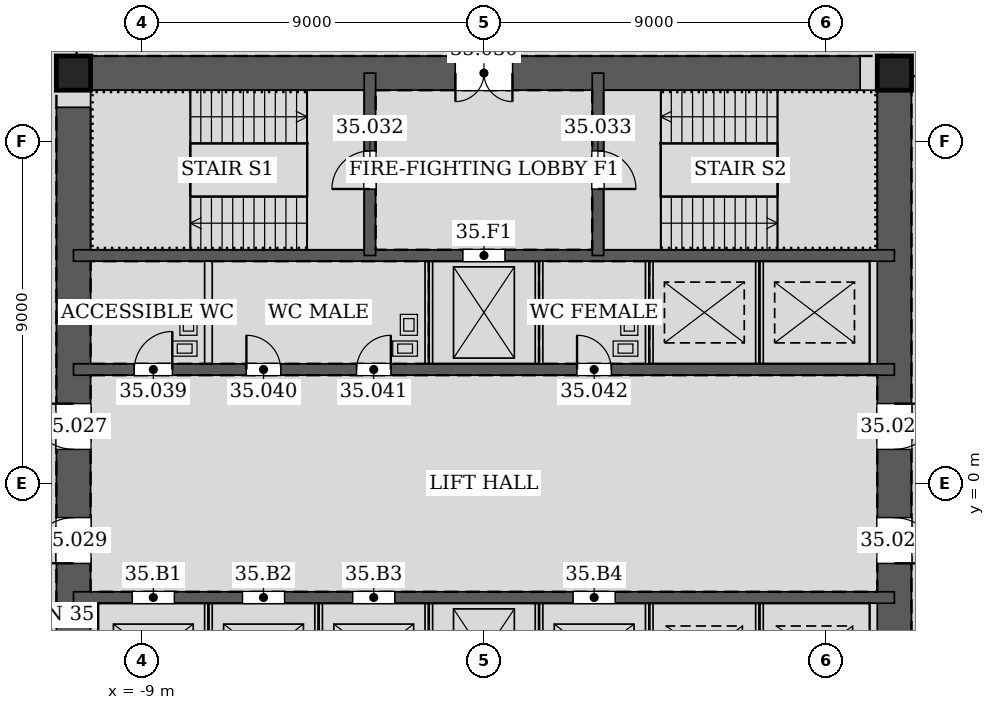
"""IFC4 building model, lengths in metres.
Left out: names, types, materials, properties, quantities, classifications, styles, units other than length and angle.
Written with IfcOpenShell. Run it as: python <this file> out.ifc"""

import sys

from ifc_helpers import new_model, si_unit, direction, frame, frame_2d, origin, origin_2d, place, context, subcontext, project, spatial, rectangle, hollow_rectangle, extrude, element, fill, save


model = new_model("IFC4")
c1 = context("Model", 3, precision=1e-05, world=origin(), true_north=direction((0.0, 1.0)))
c2 = subcontext(c1, "Body", "Model", "MODEL_VIEW")
j1 = project(units=[si_unit("LENGTHUNIT", "METRE"), si_unit("PLANEANGLEUNIT", "RADIAN")], contexts=[c1])
p1 = place(None, origin())
s1 = spatial("IfcSite", under=j1, at=p1, CompositionType="ELEMENT")
p2 = place(p1, origin())
s2 = spatial("IfcBuilding", under=s1, at=p2, CompositionType="ELEMENT")
p3 = place(p2, frame((0.0, 0.0, 155.4)))
s3 = spatial("IfcBuildingStorey", under=s2, at=p3, CompositionType="ELEMENT", Elevation=155.4)
for number, where, z_axis, x_axis in (
    (1, (10.8, 10.8, 0.0), (0.0, 0.0, 1.0), (1.0, 0.0, 0.0)),
    (2, (-10.8, 10.8, 0.0), (0.0, 0.0, 1.0), (1.0, 0.0, 0.0)),
):
    element("IfcColumn", number, at=place(p3, frame(where, z_axis=z_axis, x_axis=x_axis)), inside=s3, PredefinedType="COLUMN", context=c2, shape_type="SweptSolid", body=[
        extrude(hollow_rectangle(XDim=0.9, YDim=0.9, WallThickness=0.06, at=origin_2d()), origin(), (0.0, 0.0, 1.0), 4.2),
    ])
p4 = place(p3, frame((10.8, -10.8, 0.0), z_axis=(0.0, 0.0, 1.0), x_axis=(0.0, 1.0, 0.0)))
e3 = element("IfcWall", 3, at=p4, inside=s3, PredefinedType="SOLIDWALL", context=c2, shape_type="SweptSolid", body=[
    extrude(rectangle(XDim=21.6, YDim=0.9, at=frame_2d((10.8, 0.0))), origin(), (0.0, 0.0, 1.0), 4.2),
])
p5 = place(p4, frame((11.7, 0.0, 0.0)))
e4 = element("IfcOpeningElement", 4, at=p5, cuts=e3, PredefinedType="OPENING", context=c2, shape_type="SweptSolid", body=[
    extrude(rectangle(XDim=1.2, YDim=2.1, at=frame_2d((0.6, 1.05))), frame((0.0, 0.46, 0.0), z_axis=(0.0, -1.0, 0.0), x_axis=(1.0, 0.0, 0.0)), (0.0, 0.0, 1.0), 0.92),
])
p6 = place(p4, frame((8.7, 0.0, 0.0)))
e5 = element("IfcOpeningElement", 5, at=p6, cuts=e3, PredefinedType="OPENING", context=c2, shape_type="SweptSolid", body=[
    extrude(rectangle(XDim=1.2, YDim=2.1, at=frame_2d((0.6, 1.05))), frame((0.0, 0.46, 0.0), z_axis=(0.0, -1.0, 0.0), x_axis=(1.0, 0.0, 0.0)), (0.0, 0.0, 1.0), 0.92),
])
p7 = place(p3, frame((10.8, 10.8, 0.0), z_axis=(0.0, 0.0, 1.0), x_axis=(-1.0, 0.0, 0.0)))
e6 = element("IfcWall", 6, at=p7, inside=s3, PredefinedType="SOLIDWALL", context=c2, shape_type="SweptSolid", body=[
    extrude(rectangle(XDim=21.6, YDim=0.9, at=frame_2d((10.8, 0.0))), origin(), (0.0, 0.0, 1.0), 4.2),
])
p8 = place(p7, frame((10.05, 0.0, 0.0)))
e7 = element("IfcOpeningElement", 7, at=p8, cuts=e6, PredefinedType="OPENING", context=c2, shape_type="SweptSolid", body=[
    extrude(rectangle(XDim=1.5, YDim=2.1, at=frame_2d((0.75, 1.05))), frame((0.0, 0.46, 0.0), z_axis=(0.0, -1.0, 0.0), x_axis=(1.0, 0.0, 0.0)), (0.0, 0.0, 1.0), 0.92),
])
p9 = place(p3, frame((-10.8, 10.8, 0.0), z_axis=(0.0, 0.0, 1.0), x_axis=(0.0, -1.0, 0.0)))
e8 = element("IfcWall", 8, at=p9, inside=s3, PredefinedType="SOLIDWALL", context=c2, shape_type="SweptSolid", body=[
    extrude(rectangle(XDim=21.6, YDim=0.9, at=frame_2d((10.8, 0.0))), origin(), (0.0, 0.0, 1.0), 4.2),
])
p10 = place(p9, frame((8.7, 0.0, 0.0)))
e9 = element("IfcOpeningElement", 9, at=p10, cuts=e8, PredefinedType="OPENING", context=c2, shape_type="SweptSolid", body=[
    extrude(rectangle(XDim=1.2, YDim=2.1, at=frame_2d((0.6, 1.05))), frame((0.0, 0.46, 0.0), z_axis=(0.0, -1.0, 0.0), x_axis=(1.0, 0.0, 0.0)), (0.0, 0.0, 1.0), 0.92),
])
p11 = place(p9, frame((11.7, 0.0, 0.0)))
e10 = element("IfcOpeningElement", 10, at=p11, cuts=e8, PredefinedType="OPENING", context=c2, shape_type="SweptSolid", body=[
    extrude(rectangle(XDim=1.2, YDim=2.1, at=frame_2d((0.6, 1.05))), frame((0.0, 0.46, 0.0), z_axis=(0.0, -1.0, 0.0), x_axis=(1.0, 0.0, 0.0)), (0.0, 0.0, 1.0), 0.92),
])
p12 = place(p3, frame((-10.8, 3.0, 0.0), z_axis=(0.0, 0.0, 1.0), x_axis=(1.0, 0.0, 0.0)))
e11 = element("IfcWall", 11, at=p12, inside=s3, PredefinedType="SOLIDWALL", context=c2, shape_type="SweptSolid", body=[
    extrude(rectangle(XDim=21.6, YDim=0.3, at=frame_2d((10.8, 0.0))), origin(), (0.0, 0.0, 1.0), 4.2),
])
p13 = place(p12, frame((1.6, 0.0, 0.0)))
e12 = element("IfcOpeningElement", 12, at=p13, cuts=e11, PredefinedType="OPENING", context=c2, shape_type="SweptSolid", body=[
    extrude(rectangle(XDim=1.0, YDim=2.1, at=frame_2d((0.5, 1.05))), frame((0.0, 0.16, 0.0), z_axis=(0.0, -1.0, 0.0), x_axis=(1.0, 0.0, 0.0)), (0.0, 0.0, 1.0), 0.32),
])
p14 = place(p12, frame((4.55, 0.0, 0.0)))
e13 = element("IfcOpeningElement", 13, at=p14, cuts=e11, PredefinedType="OPENING", context=c2, shape_type="SweptSolid", body=[
    extrude(rectangle(XDim=0.9, YDim=2.1, at=frame_2d((0.45, 1.05))), frame((0.0, 0.16, 0.0), z_axis=(0.0, -1.0, 0.0), x_axis=(1.0, 0.0, 0.0)), (0.0, 0.0, 1.0), 0.32),
])
p15 = place(p12, frame((7.45, 0.0, 0.0)))
e14 = element("IfcOpeningElement", 14, at=p15, cuts=e11, PredefinedType="OPENING", context=c2, shape_type="SweptSolid", body=[
    extrude(rectangle(XDim=0.9, YDim=2.1, at=frame_2d((0.45, 1.05))), frame((0.0, 0.16, 0.0), z_axis=(0.0, -1.0, 0.0), x_axis=(1.0, 0.0, 0.0)), (0.0, 0.0, 1.0), 0.32),
])
p16 = place(p12, frame((13.25, 0.0, 0.0)))
e15 = element("IfcOpeningElement", 15, at=p16, cuts=e11, PredefinedType="OPENING", context=c2, shape_type="SweptSolid", body=[
    extrude(rectangle(XDim=0.9, YDim=2.1, at=frame_2d((0.45, 1.05))), frame((0.0, 0.16, 0.0), z_axis=(0.0, -1.0, 0.0), x_axis=(1.0, 0.0, 0.0)), (0.0, 0.0, 1.0), 0.32),
])
p17 = place(p3, frame((-10.8, 6.0, 0.0), z_axis=(0.0, 0.0, 1.0), x_axis=(1.0, 0.0, 0.0)))
e16 = element("IfcWall", 16, at=p17, inside=s3, PredefinedType="SOLIDWALL", context=c2, shape_type="SweptSolid", body=[
    extrude(rectangle(XDim=21.6, YDim=0.3, at=frame_2d((10.8, 0.0))), origin(), (0.0, 0.0, 1.0), 4.2),
])
p18 = place(p17, frame((10.25, 0.0, 0.0)))
e17 = element("IfcOpeningElement", 17, at=p18, cuts=e16, PredefinedType="OPENING", context=c2, shape_type="SweptSolid", body=[
    extrude(rectangle(XDim=1.1, YDim=2.1, at=frame_2d((0.55, 1.05))), frame((0.0, 0.16, 0.0), z_axis=(0.0, -1.0, 0.0), x_axis=(1.0, 0.0, 0.0)), (0.0, 0.0, 1.0), 0.32),
])
p19 = place(p3, frame((-3.0, 6.0, 0.0), z_axis=(0.0, 0.0, 1.0), x_axis=(0.0, 1.0, 0.0)))
e18 = element("IfcWall", 18, at=p19, inside=s3, PredefinedType="SOLIDWALL", context=c2, shape_type="SweptSolid", body=[
    extrude(rectangle(XDim=4.8, YDim=0.3, at=frame_2d((2.4, 0.0))), origin(), (0.0, 0.0, 1.0), 4.2),
])
p20 = place(p19, frame((1.75, 0.0, 0.0)))
e19 = element("IfcOpeningElement", 19, at=p20, cuts=e18, PredefinedType="OPENING", context=c2, shape_type="SweptSolid", body=[
    extrude(rectangle(XDim=1.0, YDim=2.1, at=frame_2d((0.5, 1.05))), frame((0.0, 0.16, 0.0), z_axis=(0.0, -1.0, 0.0), x_axis=(1.0, 0.0, 0.0)), (0.0, 0.0, 1.0), 0.32),
])
p21 = place(p3, frame((3.0, 6.0, 0.0), z_axis=(0.0, 0.0, 1.0), x_axis=(0.0, 1.0, 0.0)))
e20 = element("IfcWall", 20, at=p21, inside=s3, PredefinedType="SOLIDWALL", context=c2, shape_type="SweptSolid", body=[
    extrude(rectangle(XDim=4.8, YDim=0.3, at=frame_2d((2.4, 0.0))), origin(), (0.0, 0.0, 1.0), 4.2),
])
p22 = place(p21, frame((1.75, 0.0, 0.0)))
e21 = element("IfcOpeningElement", 21, at=p22, cuts=e20, PredefinedType="OPENING", context=c2, shape_type="SweptSolid", body=[
    extrude(rectangle(XDim=1.0, YDim=2.1, at=frame_2d((0.5, 1.05))), frame((0.0, 0.16, 0.0), z_axis=(0.0, -1.0, 0.0), x_axis=(1.0, 0.0, 0.0)), (0.0, 0.0, 1.0), 0.32),
])
p23 = place(p3, frame((-10.8, -3.0, 0.0), z_axis=(0.0, 0.0, 1.0), x_axis=(1.0, 0.0, 0.0)))
e22 = element("IfcWall", 22, at=p23, inside=s3, PredefinedType="SOLIDWALL", context=c2, shape_type="SweptSolid", body=[
    extrude(rectangle(XDim=21.6, YDim=0.3, at=frame_2d((10.8, 0.0))), origin(), (0.0, 0.0, 1.0), 4.2),
])
p24 = place(p23, frame((1.55, 0.0, 0.0)))
e23 = element("IfcOpeningElement", 23, at=p24, cuts=e22, PredefinedType="OPENING", context=c2, shape_type="SweptSolid", body=[
    extrude(rectangle(XDim=1.1, YDim=2.1, at=frame_2d((0.55, 1.05))), frame((0.0, 0.16, 0.0), z_axis=(0.0, -1.0, 0.0), x_axis=(1.0, 0.0, 0.0)), (0.0, 0.0, 1.0), 0.32),
])
p25 = place(p23, frame((4.45, 0.0, 0.0)))
e24 = element("IfcOpeningElement", 24, at=p25, cuts=e22, PredefinedType="OPENING", context=c2, shape_type="SweptSolid", body=[
    extrude(rectangle(XDim=1.1, YDim=2.1, at=frame_2d((0.55, 1.05))), frame((0.0, 0.16, 0.0), z_axis=(0.0, -1.0, 0.0), x_axis=(1.0, 0.0, 0.0)), (0.0, 0.0, 1.0), 0.32),
])
p26 = place(p23, frame((7.35, 0.0, 0.0)))
e25 = element("IfcOpeningElement", 25, at=p26, cuts=e22, PredefinedType="OPENING", context=c2, shape_type="SweptSolid", body=[
    extrude(rectangle(XDim=1.1, YDim=2.1, at=frame_2d((0.55, 1.05))), frame((0.0, 0.16, 0.0), z_axis=(0.0, -1.0, 0.0), x_axis=(1.0, 0.0, 0.0)), (0.0, 0.0, 1.0), 0.32),
])
p27 = place(p23, frame((13.15, 0.0, 0.0)))
e26 = element("IfcOpeningElement", 26, at=p27, cuts=e22, PredefinedType="OPENING", context=c2, shape_type="SweptSolid", body=[
    extrude(rectangle(XDim=1.1, YDim=2.1, at=frame_2d((0.55, 1.05))), frame((0.0, 0.16, 0.0), z_axis=(0.0, -1.0, 0.0), x_axis=(1.0, 0.0, 0.0)), (0.0, 0.0, 1.0), 0.32),
])
for number, where, z_axis, x_axis in (
    (27, (-7.25, 3.15, 0.0), (0.0, 0.0, 1.0), (0.0, 1.0, 0.0)),
    (28, (-1.45, 3.15, 0.0), (0.0, 0.0, 1.0), (0.0, 1.0, 0.0)),
    (29, (1.45, 3.15, 0.0), (0.0, 0.0, 1.0), (0.0, 1.0, 0.0)),
    (30, (4.35, 3.15, 0.0), (0.0, 0.0, 1.0), (0.0, 1.0, 0.0)),
):
    element("IfcWall", number, at=place(p3, frame(where, z_axis=z_axis, x_axis=x_axis)), inside=s3, PredefinedType="PARTITIONING", context=c2, shape_type="SweptSolid", body=[
        extrude(rectangle(XDim=2.7, YDim=0.2, at=frame_2d((1.35, 0.0))), origin(), (0.0, 0.0, 1.0), 4.035),
    ])
for number, where, z_axis, x_axis in (
    (31, (7.25, 3.15, 0.0), (0.0, 0.0, 1.0), (0.0, 1.0, 0.0)),
    (32, (-7.25, -5.85, 0.0), (0.0, 0.0, 1.0), (0.0, 1.0, 0.0)),
    (33, (-4.35, -5.85, 0.0), (0.0, 0.0, 1.0), (0.0, 1.0, 0.0)),
    (34, (-1.45, -5.85, 0.0), (0.0, 0.0, 1.0), (0.0, 1.0, 0.0)),
    (35, (1.45, -5.85, 0.0), (0.0, 0.0, 1.0), (0.0, 1.0, 0.0)),
    (36, (4.35, -5.85, 0.0), (0.0, 0.0, 1.0), (0.0, 1.0, 0.0)),
    (37, (7.25, -5.85, 0.0), (0.0, 0.0, 1.0), (0.0, 1.0, 0.0)),
):
    element("IfcWall", number, at=place(p3, frame(where, z_axis=z_axis, x_axis=x_axis)), inside=s3, PredefinedType="PARTITIONING", context=c2, shape_type="SweptSolid", body=[
        extrude(rectangle(XDim=2.7, YDim=0.2, at=frame_2d((1.35, 0.0))), origin(), (0.0, 0.0, 1.0), 4.2),
    ])
p28 = place(p5, frame((1.2, 0.0, 0.0), z_axis=(0.0, 0.0, 1.0), x_axis=(-1.0, 0.0, 0.0)))
e38 = element("IfcDoor", 38, at=p28, inside=s3, OperationType="SINGLE_SWING_LEFT", PredefinedType="DOOR", context=c2, shape_type="SweptSolid", body=[
    extrude(rectangle(XDim=1.2, YDim=2.1, at=frame_2d((0.6, 1.05))), frame((0.0, 0.025, 0.0), z_axis=(0.0, -1.0, 0.0), x_axis=(1.0, 0.0, 0.0)), (0.0, 0.0, 1.0), 0.05),
])
fill(e4, e38)
p29 = place(p10, frame((1.2, 0.0, 0.0), z_axis=(0.0, 0.0, 1.0), x_axis=(-1.0, 0.0, 0.0)))
e39 = element("IfcDoor", 39, at=p29, inside=s3, OperationType="SINGLE_SWING_RIGHT", PredefinedType="DOOR", context=c2, shape_type="SweptSolid", body=[
    extrude(rectangle(XDim=1.2, YDim=2.1, at=frame_2d((0.6, 1.05))), frame((0.0, 0.025, 0.0), z_axis=(0.0, -1.0, 0.0), x_axis=(1.0, 0.0, 0.0)), (0.0, 0.0, 1.0), 0.05),
])
fill(e9, e39)
p30 = place(p6, frame((1.2, 0.0, 0.0), z_axis=(0.0, 0.0, 1.0), x_axis=(-1.0, 0.0, 0.0)))
e40 = element("IfcDoor", 40, at=p30, inside=s3, OperationType="SINGLE_SWING_RIGHT", PredefinedType="DOOR", context=c2, shape_type="SweptSolid", body=[
    extrude(rectangle(XDim=1.2, YDim=2.1, at=frame_2d((0.6, 1.05))), frame((0.0, 0.025, 0.0), z_axis=(0.0, -1.0, 0.0), x_axis=(1.0, 0.0, 0.0)), (0.0, 0.0, 1.0), 0.05),
])
fill(e5, e40)
p31 = place(p11, frame((1.2, 0.0, 0.0), z_axis=(0.0, 0.0, 1.0), x_axis=(-1.0, 0.0, 0.0)))
e41 = element("IfcDoor", 41, at=p31, inside=s3, OperationType="SINGLE_SWING_LEFT", PredefinedType="DOOR", context=c2, shape_type="SweptSolid", body=[
    extrude(rectangle(XDim=1.2, YDim=2.1, at=frame_2d((0.6, 1.05))), frame((0.0, 0.025, 0.0), z_axis=(0.0, -1.0, 0.0), x_axis=(1.0, 0.0, 0.0)), (0.0, 0.0, 1.0), 0.05),
])
fill(e10, e41)
p32 = place(p8, origin())
e42 = element("IfcDoor", 42, at=p32, inside=s3, OperationType="DOUBLE_DOOR_SINGLE_SWING", PredefinedType="DOOR", context=c2, shape_type="SweptSolid", body=[
    extrude(rectangle(XDim=1.5, YDim=2.1, at=frame_2d((0.75, 1.05))), frame((0.0, 0.025, 0.0), z_axis=(0.0, -1.0, 0.0), x_axis=(1.0, 0.0, 0.0)), (0.0, 0.0, 1.0), 0.05),
])
fill(e7, e42)
p33 = place(p20, origin())
e43 = element("IfcDoor", 43, at=p33, inside=s3, OperationType="SINGLE_SWING_LEFT", PredefinedType="DOOR", context=c2, shape_type="SweptSolid", body=[
    extrude(rectangle(XDim=1.0, YDim=2.1, at=frame_2d((0.5, 1.05))), frame((0.0, 0.025, 0.0), z_axis=(0.0, -1.0, 0.0), x_axis=(1.0, 0.0, 0.0)), (0.0, 0.0, 1.0), 0.05),
])
fill(e19, e43)
p34 = place(p22, frame((1.0, 0.0, 0.0), z_axis=(0.0, 0.0, 1.0), x_axis=(-1.0, 0.0, 0.0)))
e44 = element("IfcDoor", 44, at=p34, inside=s3, OperationType="SINGLE_SWING_RIGHT", PredefinedType="DOOR", context=c2, shape_type="SweptSolid", body=[
    extrude(rectangle(XDim=1.0, YDim=2.1, at=frame_2d((0.5, 1.05))), frame((0.0, 0.025, 0.0), z_axis=(0.0, -1.0, 0.0), x_axis=(1.0, 0.0, 0.0)), (0.0, 0.0, 1.0), 0.05),
])
fill(e21, e44)
p35 = place(p13, origin())
e45 = element("IfcDoor", 45, at=p35, inside=s3, OperationType="SINGLE_SWING_RIGHT", PredefinedType="DOOR", context=c2, shape_type="SweptSolid", body=[
    extrude(rectangle(XDim=1.0, YDim=2.1, at=frame_2d((0.5, 1.05))), frame((0.0, 0.025, 0.0), z_axis=(0.0, -1.0, 0.0), x_axis=(1.0, 0.0, 0.0)), (0.0, 0.0, 1.0), 0.05),
])
fill(e12, e45)
p36 = place(p14, origin())
e46 = element("IfcDoor", 46, at=p36, inside=s3, OperationType="SINGLE_SWING_LEFT", PredefinedType="DOOR", context=c2, shape_type="SweptSolid", body=[
    extrude(rectangle(XDim=0.9, YDim=2.1, at=frame_2d((0.45, 1.05))), frame((0.0, 0.025, 0.0), z_axis=(0.0, -1.0, 0.0), x_axis=(1.0, 0.0, 0.0)), (0.0, 0.0, 1.0), 0.05),
])
fill(e13, e46)
p37 = place(p15, origin())
e47 = element("IfcDoor", 47, at=p37, inside=s3, OperationType="SINGLE_SWING_RIGHT", PredefinedType="DOOR", context=c2, shape_type="SweptSolid", body=[
    extrude(rectangle(XDim=0.9, YDim=2.1, at=frame_2d((0.45, 1.05))), frame((0.0, 0.025, 0.0), z_axis=(0.0, -1.0, 0.0), x_axis=(1.0, 0.0, 0.0)), (0.0, 0.0, 1.0), 0.05),
])
fill(e14, e47)
p38 = place(p16, origin())
e48 = element("IfcDoor", 48, at=p38, inside=s3, OperationType="SINGLE_SWING_LEFT", PredefinedType="DOOR", context=c2, shape_type="SweptSolid", body=[
    extrude(rectangle(XDim=0.9, YDim=2.1, at=frame_2d((0.45, 1.05))), frame((0.0, 0.025, 0.0), z_axis=(0.0, -1.0, 0.0), x_axis=(1.0, 0.0, 0.0)), (0.0, 0.0, 1.0), 0.05),
])
fill(e15, e48)
p39 = place(p18, origin())
e49 = element("IfcDoor", 49, at=p39, inside=s3, OperationType="DOUBLE_DOOR_SLIDING", PredefinedType="DOOR", context=c2, shape_type="SweptSolid", body=[
    extrude(rectangle(XDim=1.1, YDim=2.1, at=frame_2d((0.55, 1.05))), frame((0.0, 0.025, 0.0), z_axis=(0.0, -1.0, 0.0), x_axis=(1.0, 0.0, 0.0)), (0.0, 0.0, 1.0), 0.05),
])
fill(e17, e49)
p40 = place(p24, origin())
e50 = element("IfcDoor", 50, at=p40, inside=s3, OperationType="DOUBLE_DOOR_SLIDING", PredefinedType="DOOR", context=c2, shape_type="SweptSolid", body=[
    extrude(rectangle(XDim=1.1, YDim=2.1, at=frame_2d((0.55, 1.05))), frame((0.0, 0.025, 0.0), z_axis=(0.0, -1.0, 0.0), x_axis=(1.0, 0.0, 0.0)), (0.0, 0.0, 1.0), 0.05),
])
fill(e23, e50)
p41 = place(p25, origin())
e51 = element("IfcDoor", 51, at=p41, inside=s3, OperationType="DOUBLE_DOOR_SLIDING", PredefinedType="DOOR", context=c2, shape_type="SweptSolid", body=[
    extrude(rectangle(XDim=1.1, YDim=2.1, at=frame_2d((0.55, 1.05))), frame((0.0, 0.025, 0.0), z_axis=(0.0, -1.0, 0.0), x_axis=(1.0, 0.0, 0.0)), (0.0, 0.0, 1.0), 0.05),
])
fill(e24, e51)
p42 = place(p26, origin())
e52 = element("IfcDoor", 52, at=p42, inside=s3, OperationType="DOUBLE_DOOR_SLIDING", PredefinedType="DOOR", context=c2, shape_type="SweptSolid", body=[
    extrude(rectangle(XDim=1.1, YDim=2.1, at=frame_2d((0.55, 1.05))), frame((0.0, 0.025, 0.0), z_axis=(0.0, -1.0, 0.0), x_axis=(1.0, 0.0, 0.0)), (0.0, 0.0, 1.0), 0.05),
])
fill(e25, e52)
p43 = place(p27, origin())
e53 = element("IfcDoor", 53, at=p43, inside=s3, OperationType="DOUBLE_DOOR_SLIDING", PredefinedType="DOOR", context=c2, shape_type="SweptSolid", body=[
    extrude(rectangle(XDim=1.1, YDim=2.1, at=frame_2d((0.55, 1.05))), frame((0.0, 0.025, 0.0), z_axis=(0.0, -1.0, 0.0), x_axis=(1.0, 0.0, 0.0)), (0.0, 0.0, 1.0), 0.05),
])
fill(e26, e53)
save(model, sys.argv[1])
